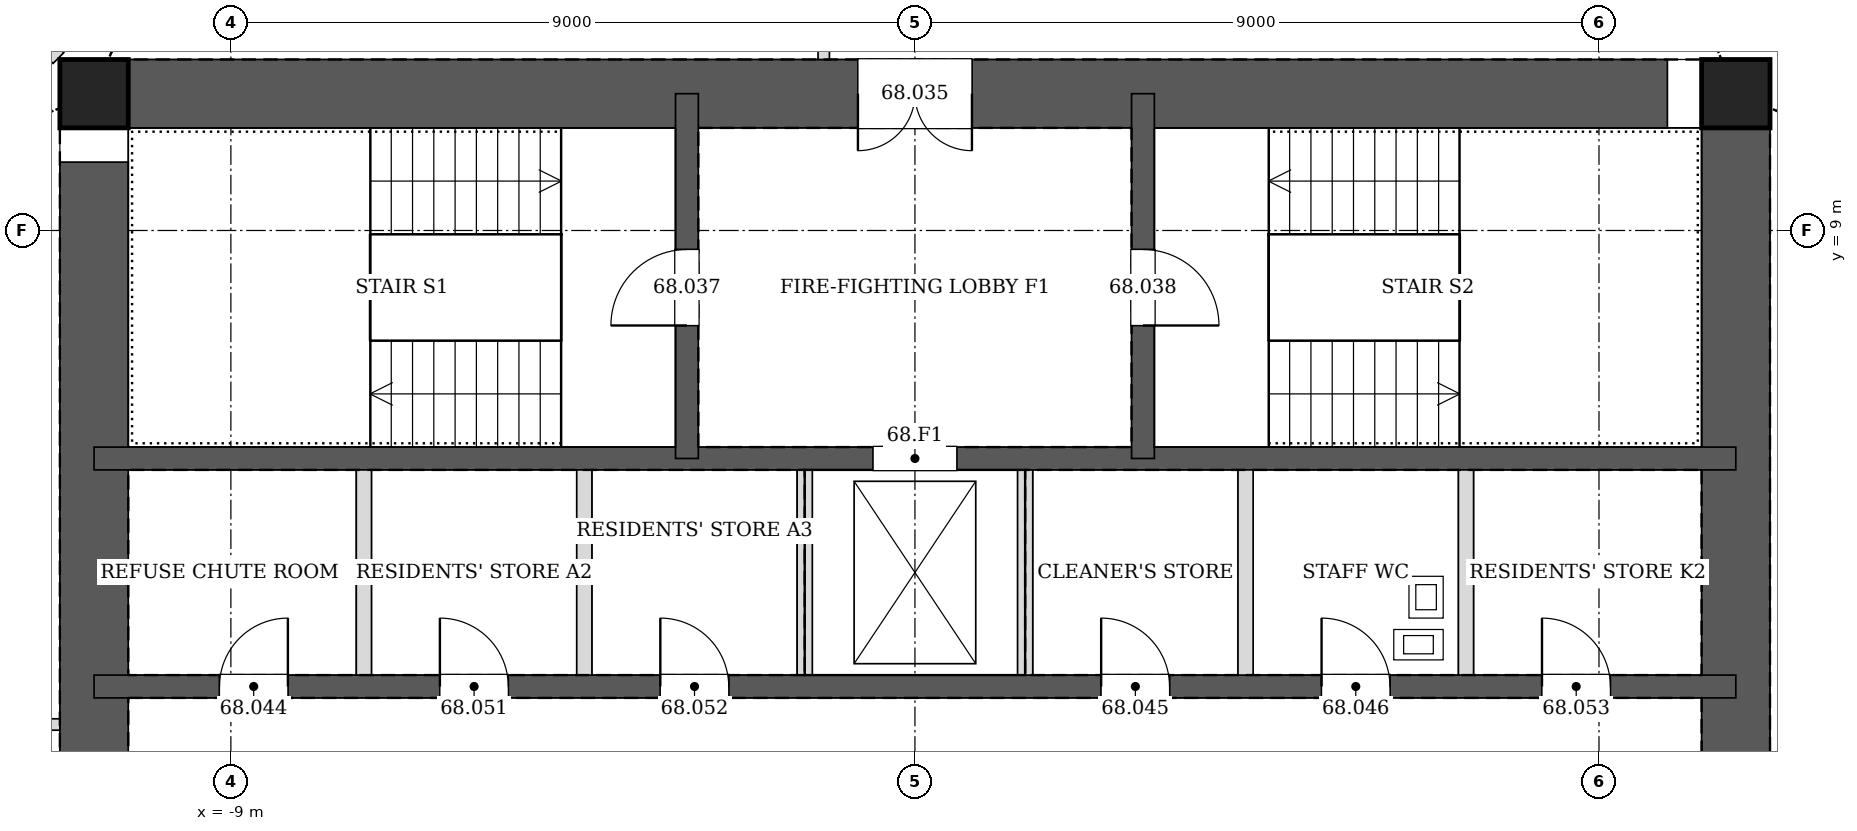
"""IFC4 building model, lengths in metres.
Left out: names, types, materials, properties, quantities, classifications, styles, units other than length and angle.
Written with IfcOpenShell. Run it as: python <this file> out.ifc"""

import sys

from ifc_helpers import new_model, si_unit, direction, frame, frame_2d, origin, origin_2d, place, context, subcontext, project, spatial, rectangle, hollow_rectangle, extrude, element, fill, save


model = new_model("IFC4")
c1 = context("Model", 3, precision=1e-05, world=origin(), true_north=direction((0.0, 1.0)))
c2 = subcontext(c1, "Body", "Model", "MODEL_VIEW")
j1 = project(units=[si_unit("LENGTHUNIT", "METRE"), si_unit("PLANEANGLEUNIT", "RADIAN")], contexts=[c1])
p1 = place(None, origin())
s1 = spatial("IfcSite", under=j1, at=p1, CompositionType="ELEMENT")
p2 = place(p1, origin())
s2 = spatial("IfcBuilding", under=s1, at=p2, CompositionType="ELEMENT")
p3 = place(p2, frame((0.0, 0.0, 281.0)))
s3 = spatial("IfcBuildingStorey", under=s2, at=p3, CompositionType="ELEMENT", Elevation=281.0)
for number, where, z_axis, x_axis in (
    (1, (10.8, 10.8, 0.0), (0.0, 0.0, 1.0), (1.0, 0.0, 0.0)),
    (2, (-10.8, 10.8, 0.0), (0.0, 0.0, 1.0), (1.0, 0.0, 0.0)),
):
    element("IfcColumn", number, at=place(p3, frame(where, z_axis=z_axis, x_axis=x_axis)), inside=s3, PredefinedType="COLUMN", context=c2, shape_type="SweptSolid", body=[
        extrude(hollow_rectangle(XDim=0.9, YDim=0.9, WallThickness=0.04, at=origin_2d()), origin(), (0.0, 0.0, 1.0), 3.4),
    ])
p4 = place(p3, frame((10.8, -10.8, 0.0), z_axis=(0.0, 0.0, 1.0), x_axis=(0.0, 1.0, 0.0)))
e3 = element("IfcWall", 3, at=p4, inside=s3, PredefinedType="SOLIDWALL", context=c2, shape_type="SweptSolid", body=[
    extrude(rectangle(XDim=21.6, YDim=0.9, at=frame_2d((10.8, 0.0))), origin(), (0.0, 0.0, 1.0), 3.4),
])
p5 = place(p4, frame((11.7, 0.0, 0.0)))
e4 = element("IfcOpeningElement", 4, at=p5, cuts=e3, PredefinedType="OPENING", context=c2, shape_type="SweptSolid", body=[
    extrude(rectangle(XDim=1.2, YDim=2.1, at=frame_2d((0.6, 1.05))), frame((0.0, 0.46, 0.0), z_axis=(0.0, -1.0, 0.0), x_axis=(1.0, 0.0, 0.0)), (0.0, 0.0, 1.0), 0.92),
])
p6 = place(p4, frame((8.7, 0.0, 0.0)))
e5 = element("IfcOpeningElement", 5, at=p6, cuts=e3, PredefinedType="OPENING", context=c2, shape_type="SweptSolid", body=[
    extrude(rectangle(XDim=1.2, YDim=2.1, at=frame_2d((0.6, 1.05))), frame((0.0, 0.46, 0.0), z_axis=(0.0, -1.0, 0.0), x_axis=(1.0, 0.0, 0.0)), (0.0, 0.0, 1.0), 0.92),
])
p7 = place(p3, frame((10.8, 10.8, 0.0), z_axis=(0.0, 0.0, 1.0), x_axis=(-1.0, 0.0, 0.0)))
e6 = element("IfcWall", 6, at=p7, inside=s3, PredefinedType="SOLIDWALL", context=c2, shape_type="SweptSolid", body=[
    extrude(rectangle(XDim=21.6, YDim=0.9, at=frame_2d((10.8, 0.0))), origin(), (0.0, 0.0, 1.0), 3.4),
])
p8 = place(p7, frame((10.05, 0.0, 0.0)))
e7 = element("IfcOpeningElement", 7, at=p8, cuts=e6, PredefinedType="OPENING", context=c2, shape_type="SweptSolid", body=[
    extrude(rectangle(XDim=1.5, YDim=2.1, at=frame_2d((0.75, 1.05))), frame((0.0, 0.46, 0.0), z_axis=(0.0, -1.0, 0.0), x_axis=(1.0, 0.0, 0.0)), (0.0, 0.0, 1.0), 0.92),
])
p9 = place(p3, frame((-10.8, 10.8, 0.0), z_axis=(0.0, 0.0, 1.0), x_axis=(0.0, -1.0, 0.0)))
e8 = element("IfcWall", 8, at=p9, inside=s3, PredefinedType="SOLIDWALL", context=c2, shape_type="SweptSolid", body=[
    extrude(rectangle(XDim=21.6, YDim=0.9, at=frame_2d((10.8, 0.0))), origin(), (0.0, 0.0, 1.0), 3.4),
])
p10 = place(p9, frame((8.7, 0.0, 0.0)))
e9 = element("IfcOpeningElement", 9, at=p10, cuts=e8, PredefinedType="OPENING", context=c2, shape_type="SweptSolid", body=[
    extrude(rectangle(XDim=1.2, YDim=2.1, at=frame_2d((0.6, 1.05))), frame((0.0, 0.46, 0.0), z_axis=(0.0, -1.0, 0.0), x_axis=(1.0, 0.0, 0.0)), (0.0, 0.0, 1.0), 0.92),
])
p11 = place(p9, frame((11.7, 0.0, 0.0)))
e10 = element("IfcOpeningElement", 10, at=p11, cuts=e8, PredefinedType="OPENING", context=c2, shape_type="SweptSolid", body=[
    extrude(rectangle(XDim=1.2, YDim=2.1, at=frame_2d((0.6, 1.05))), frame((0.0, 0.46, 0.0), z_axis=(0.0, -1.0, 0.0), x_axis=(1.0, 0.0, 0.0)), (0.0, 0.0, 1.0), 0.92),
])
p12 = place(p3, frame((-10.8, 3.0, 0.0), z_axis=(0.0, 0.0, 1.0), x_axis=(1.0, 0.0, 0.0)))
e11 = element("IfcWall", 11, at=p12, inside=s3, PredefinedType="SOLIDWALL", context=c2, shape_type="SweptSolid", body=[
    extrude(rectangle(XDim=21.6, YDim=0.3, at=frame_2d((10.8, 0.0))), origin(), (0.0, 0.0, 1.0), 3.4),
])
p13 = place(p12, frame((1.65, 0.0, 0.0)))
e12 = element("IfcOpeningElement", 12, at=p13, cuts=e11, PredefinedType="OPENING", context=c2, shape_type="SweptSolid", body=[
    extrude(rectangle(XDim=0.9, YDim=2.1, at=frame_2d((0.45, 1.05))), frame((0.0, 0.16, 0.0), z_axis=(0.0, -1.0, 0.0), x_axis=(1.0, 0.0, 0.0)), (0.0, 0.0, 1.0), 0.32),
])
p14 = place(p12, frame((13.25, 0.0, 0.0)))
e13 = element("IfcOpeningElement", 13, at=p14, cuts=e11, PredefinedType="OPENING", context=c2, shape_type="SweptSolid", body=[
    extrude(rectangle(XDim=0.9, YDim=2.1, at=frame_2d((0.45, 1.05))), frame((0.0, 0.16, 0.0), z_axis=(0.0, -1.0, 0.0), x_axis=(1.0, 0.0, 0.0)), (0.0, 0.0, 1.0), 0.32),
])
p15 = place(p12, frame((16.15, 0.0, 0.0)))
e14 = element("IfcOpeningElement", 14, at=p15, cuts=e11, PredefinedType="OPENING", context=c2, shape_type="SweptSolid", body=[
    extrude(rectangle(XDim=0.9, YDim=2.1, at=frame_2d((0.45, 1.05))), frame((0.0, 0.16, 0.0), z_axis=(0.0, -1.0, 0.0), x_axis=(1.0, 0.0, 0.0)), (0.0, 0.0, 1.0), 0.32),
])
p16 = place(p12, frame((4.55, 0.0, 0.0)))
e15 = element("IfcOpeningElement", 15, at=p16, cuts=e11, PredefinedType="OPENING", context=c2, shape_type="SweptSolid", body=[
    extrude(rectangle(XDim=0.9, YDim=2.1, at=frame_2d((0.45, 1.05))), frame((0.0, 0.16, 0.0), z_axis=(0.0, -1.0, 0.0), x_axis=(1.0, 0.0, 0.0)), (0.0, 0.0, 1.0), 0.32),
])
p17 = place(p12, frame((7.45, 0.0, 0.0)))
e16 = element("IfcOpeningElement", 16, at=p17, cuts=e11, PredefinedType="OPENING", context=c2, shape_type="SweptSolid", body=[
    extrude(rectangle(XDim=0.9, YDim=2.1, at=frame_2d((0.45, 1.05))), frame((0.0, 0.16, 0.0), z_axis=(0.0, -1.0, 0.0), x_axis=(1.0, 0.0, 0.0)), (0.0, 0.0, 1.0), 0.32),
])
p18 = place(p12, frame((19.05, 0.0, 0.0)))
e17 = element("IfcOpeningElement", 17, at=p18, cuts=e11, PredefinedType="OPENING", context=c2, shape_type="SweptSolid", body=[
    extrude(rectangle(XDim=0.9, YDim=2.1, at=frame_2d((0.45, 1.05))), frame((0.0, 0.16, 0.0), z_axis=(0.0, -1.0, 0.0), x_axis=(1.0, 0.0, 0.0)), (0.0, 0.0, 1.0), 0.32),
])
p19 = place(p3, frame((-10.8, 6.0, 0.0), z_axis=(0.0, 0.0, 1.0), x_axis=(1.0, 0.0, 0.0)))
e18 = element("IfcWall", 18, at=p19, inside=s3, PredefinedType="SOLIDWALL", context=c2, shape_type="SweptSolid", body=[
    extrude(rectangle(XDim=21.6, YDim=0.3, at=frame_2d((10.8, 0.0))), origin(), (0.0, 0.0, 1.0), 3.4),
])
p20 = place(p19, frame((10.25, 0.0, 0.0)))
e19 = element("IfcOpeningElement", 19, at=p20, cuts=e18, PredefinedType="OPENING", context=c2, shape_type="SweptSolid", body=[
    extrude(rectangle(XDim=1.1, YDim=2.1, at=frame_2d((0.55, 1.05))), frame((0.0, 0.16, 0.0), z_axis=(0.0, -1.0, 0.0), x_axis=(1.0, 0.0, 0.0)), (0.0, 0.0, 1.0), 0.32),
])
p21 = place(p3, frame((-3.0, 6.0, 0.0), z_axis=(0.0, 0.0, 1.0), x_axis=(0.0, 1.0, 0.0)))
e20 = element("IfcWall", 20, at=p21, inside=s3, PredefinedType="SOLIDWALL", context=c2, shape_type="SweptSolid", body=[
    extrude(rectangle(XDim=4.8, YDim=0.3, at=frame_2d((2.4, 0.0))), origin(), (0.0, 0.0, 1.0), 3.4),
])
p22 = place(p21, frame((1.75, 0.0, 0.0)))
e21 = element("IfcOpeningElement", 21, at=p22, cuts=e20, PredefinedType="OPENING", context=c2, shape_type="SweptSolid", body=[
    extrude(rectangle(XDim=1.0, YDim=2.1, at=frame_2d((0.5, 1.05))), frame((0.0, 0.16, 0.0), z_axis=(0.0, -1.0, 0.0), x_axis=(1.0, 0.0, 0.0)), (0.0, 0.0, 1.0), 0.32),
])
p23 = place(p3, frame((3.0, 6.0, 0.0), z_axis=(0.0, 0.0, 1.0), x_axis=(0.0, 1.0, 0.0)))
e22 = element("IfcWall", 22, at=p23, inside=s3, PredefinedType="SOLIDWALL", context=c2, shape_type="SweptSolid", body=[
    extrude(rectangle(XDim=4.8, YDim=0.3, at=frame_2d((2.4, 0.0))), origin(), (0.0, 0.0, 1.0), 3.4),
])
p24 = place(p23, frame((1.75, 0.0, 0.0)))
e23 = element("IfcOpeningElement", 23, at=p24, cuts=e22, PredefinedType="OPENING", context=c2, shape_type="SweptSolid", body=[
    extrude(rectangle(XDim=1.0, YDim=2.1, at=frame_2d((0.5, 1.05))), frame((0.0, 0.16, 0.0), z_axis=(0.0, -1.0, 0.0), x_axis=(1.0, 0.0, 0.0)), (0.0, 0.0, 1.0), 0.32),
])
p25 = place(p3, frame((-1.2, 13.05, 0.0), z_axis=(0.0, 0.0, 1.0), x_axis=(0.0, -1.0, 0.0)))
e24 = element("IfcWall", 24, at=p25, inside=s3, PredefinedType="PARTITIONING", context=c2, shape_type="SweptSolid", body=[
    extrude(rectangle(XDim=1.8, YDim=0.15, at=frame_2d((0.9, 0.0))), origin(), (0.0, 0.0, 1.0), 3.2),
])
p26 = place(p25, frame((0.425, 0.0, 0.0)))
e25 = element("IfcOpeningElement", 25, at=p26, cuts=e24, PredefinedType="OPENING", context=c2, shape_type="SweptSolid", body=[
    extrude(rectangle(XDim=0.95, YDim=2.1, at=frame_2d((0.475, 1.05))), frame((0.0, 0.085, 0.0), z_axis=(0.0, -1.0, 0.0), x_axis=(1.0, 0.0, 0.0)), (0.0, 0.0, 1.0), 0.17),
])
p27 = place(p3, frame((-11.25, 2.5, 0.0), z_axis=(0.0, 0.0, 1.0), x_axis=(-1.0, 0.0, 0.0)))
e26 = element("IfcWall", 26, at=p27, inside=s3, PredefinedType="PARTITIONING", context=c2, shape_type="SweptSolid", body=[
    extrude(rectangle(XDim=1.8, YDim=0.15, at=frame_2d((0.9, 0.0))), origin(), (0.0, 0.0, 1.0), 3.2),
])
p28 = place(p3, frame((-11.269, 11.269, 0.0), z_axis=(0.0, 0.0, 1.0), x_axis=(-0.707106781187, 0.707106781187, 0.0)))
e27 = element("IfcWall", 27, at=p28, inside=s3, PredefinedType="PARTITIONING", context=c2, shape_type="SweptSolid", body=[
    extrude(rectangle(XDim=2.52, YDim=0.2, at=frame_2d((1.26, 0.0))), origin(), (0.0, 0.0, 1.0), 2.591),
])
for number, where, z_axis, x_axis in (
    (28, (-7.25, 3.15, 0.0), (0.0, 0.0, 1.0), (0.0, 1.0, 0.0)),
    (29, (-4.35, 3.15, 0.0), (0.0, 0.0, 1.0), (0.0, 1.0, 0.0)),
    (30, (-1.45, 3.15, 0.0), (0.0, 0.0, 1.0), (0.0, 1.0, 0.0)),
    (31, (1.45, 3.15, 0.0), (0.0, 0.0, 1.0), (0.0, 1.0, 0.0)),
    (32, (4.35, 3.15, 0.0), (0.0, 0.0, 1.0), (0.0, 1.0, 0.0)),
    (33, (7.25, 3.15, 0.0), (0.0, 0.0, 1.0), (0.0, 1.0, 0.0)),
):
    element("IfcWall", number, at=place(p3, frame(where, z_axis=z_axis, x_axis=x_axis)), inside=s3, PredefinedType="PARTITIONING", context=c2, shape_type="SweptSolid", body=[
        extrude(rectangle(XDim=2.7, YDim=0.2, at=frame_2d((1.35, 0.0))), origin(), (0.0, 0.0, 1.0), 3.2),
    ])
p29 = place(p8, origin())
e34 = element("IfcDoor", 34, at=p29, inside=s3, OperationType="DOUBLE_DOOR_SINGLE_SWING", PredefinedType="DOOR", context=c2, shape_type="SweptSolid", body=[
    extrude(rectangle(XDim=1.5, YDim=2.1, at=frame_2d((0.75, 1.05))), frame((0.0, 0.025, 0.0), z_axis=(0.0, -1.0, 0.0), x_axis=(1.0, 0.0, 0.0)), (0.0, 0.0, 1.0), 0.05),
])
fill(e7, e34)
p30 = place(p22, origin())
e35 = element("IfcDoor", 35, at=p30, inside=s3, OperationType="SINGLE_SWING_LEFT", PredefinedType="DOOR", context=c2, shape_type="SweptSolid", body=[
    extrude(rectangle(XDim=1.0, YDim=2.1, at=frame_2d((0.5, 1.05))), frame((0.0, 0.025, 0.0), z_axis=(0.0, -1.0, 0.0), x_axis=(1.0, 0.0, 0.0)), (0.0, 0.0, 1.0), 0.05),
])
fill(e21, e35)
p31 = place(p24, frame((1.0, 0.0, 0.0), z_axis=(0.0, 0.0, 1.0), x_axis=(-1.0, 0.0, 0.0)))
e36 = element("IfcDoor", 36, at=p31, inside=s3, OperationType="SINGLE_SWING_RIGHT", PredefinedType="DOOR", context=c2, shape_type="SweptSolid", body=[
    extrude(rectangle(XDim=1.0, YDim=2.1, at=frame_2d((0.5, 1.05))), frame((0.0, 0.025, 0.0), z_axis=(0.0, -1.0, 0.0), x_axis=(1.0, 0.0, 0.0)), (0.0, 0.0, 1.0), 0.05),
])
fill(e23, e36)
p32 = place(p13, origin())
e37 = element("IfcDoor", 37, at=p32, inside=s3, OperationType="SINGLE_SWING_RIGHT", PredefinedType="DOOR", context=c2, shape_type="SweptSolid", body=[
    extrude(rectangle(XDim=0.9, YDim=2.1, at=frame_2d((0.45, 1.05))), frame((0.0, 0.025, 0.0), z_axis=(0.0, -1.0, 0.0), x_axis=(1.0, 0.0, 0.0)), (0.0, 0.0, 1.0), 0.05),
])
fill(e12, e37)
p33 = place(p14, origin())
e38 = element("IfcDoor", 38, at=p33, inside=s3, OperationType="SINGLE_SWING_LEFT", PredefinedType="DOOR", context=c2, shape_type="SweptSolid", body=[
    extrude(rectangle(XDim=0.9, YDim=2.1, at=frame_2d((0.45, 1.05))), frame((0.0, 0.025, 0.0), z_axis=(0.0, -1.0, 0.0), x_axis=(1.0, 0.0, 0.0)), (0.0, 0.0, 1.0), 0.05),
])
fill(e13, e38)
p34 = place(p15, origin())
e39 = element("IfcDoor", 39, at=p34, inside=s3, OperationType="SINGLE_SWING_LEFT", PredefinedType="DOOR", context=c2, shape_type="SweptSolid", body=[
    extrude(rectangle(XDim=0.9, YDim=2.1, at=frame_2d((0.45, 1.05))), frame((0.0, 0.025, 0.0), z_axis=(0.0, -1.0, 0.0), x_axis=(1.0, 0.0, 0.0)), (0.0, 0.0, 1.0), 0.05),
])
fill(e14, e39)
p35 = place(p16, origin())
e40 = element("IfcDoor", 40, at=p35, inside=s3, OperationType="SINGLE_SWING_LEFT", PredefinedType="DOOR", context=c2, shape_type="SweptSolid", body=[
    extrude(rectangle(XDim=0.9, YDim=2.1, at=frame_2d((0.45, 1.05))), frame((0.0, 0.025, 0.0), z_axis=(0.0, -1.0, 0.0), x_axis=(1.0, 0.0, 0.0)), (0.0, 0.0, 1.0), 0.05),
])
fill(e15, e40)
p36 = place(p17, origin())
e41 = element("IfcDoor", 41, at=p36, inside=s3, OperationType="SINGLE_SWING_LEFT", PredefinedType="DOOR", context=c2, shape_type="SweptSolid", body=[
    extrude(rectangle(XDim=0.9, YDim=2.1, at=frame_2d((0.45, 1.05))), frame((0.0, 0.025, 0.0), z_axis=(0.0, -1.0, 0.0), x_axis=(1.0, 0.0, 0.0)), (0.0, 0.0, 1.0), 0.05),
])
fill(e16, e41)
p37 = place(p18, origin())
e42 = element("IfcDoor", 42, at=p37, inside=s3, OperationType="SINGLE_SWING_LEFT", PredefinedType="DOOR", context=c2, shape_type="SweptSolid", body=[
    extrude(rectangle(XDim=0.9, YDim=2.1, at=frame_2d((0.45, 1.05))), frame((0.0, 0.025, 0.0), z_axis=(0.0, -1.0, 0.0), x_axis=(1.0, 0.0, 0.0)), (0.0, 0.0, 1.0), 0.05),
])
fill(e17, e42)
p38 = place(p20, origin())
e43 = element("IfcDoor", 43, at=p38, inside=s3, OperationType="DOUBLE_DOOR_SLIDING", PredefinedType="DOOR", context=c2, shape_type="SweptSolid", body=[
    extrude(rectangle(XDim=1.1, YDim=2.1, at=frame_2d((0.55, 1.05))), frame((0.0, 0.025, 0.0), z_axis=(0.0, -1.0, 0.0), x_axis=(1.0, 0.0, 0.0)), (0.0, 0.0, 1.0), 0.05),
])
fill(e19, e43)
save(model, sys.argv[1])
